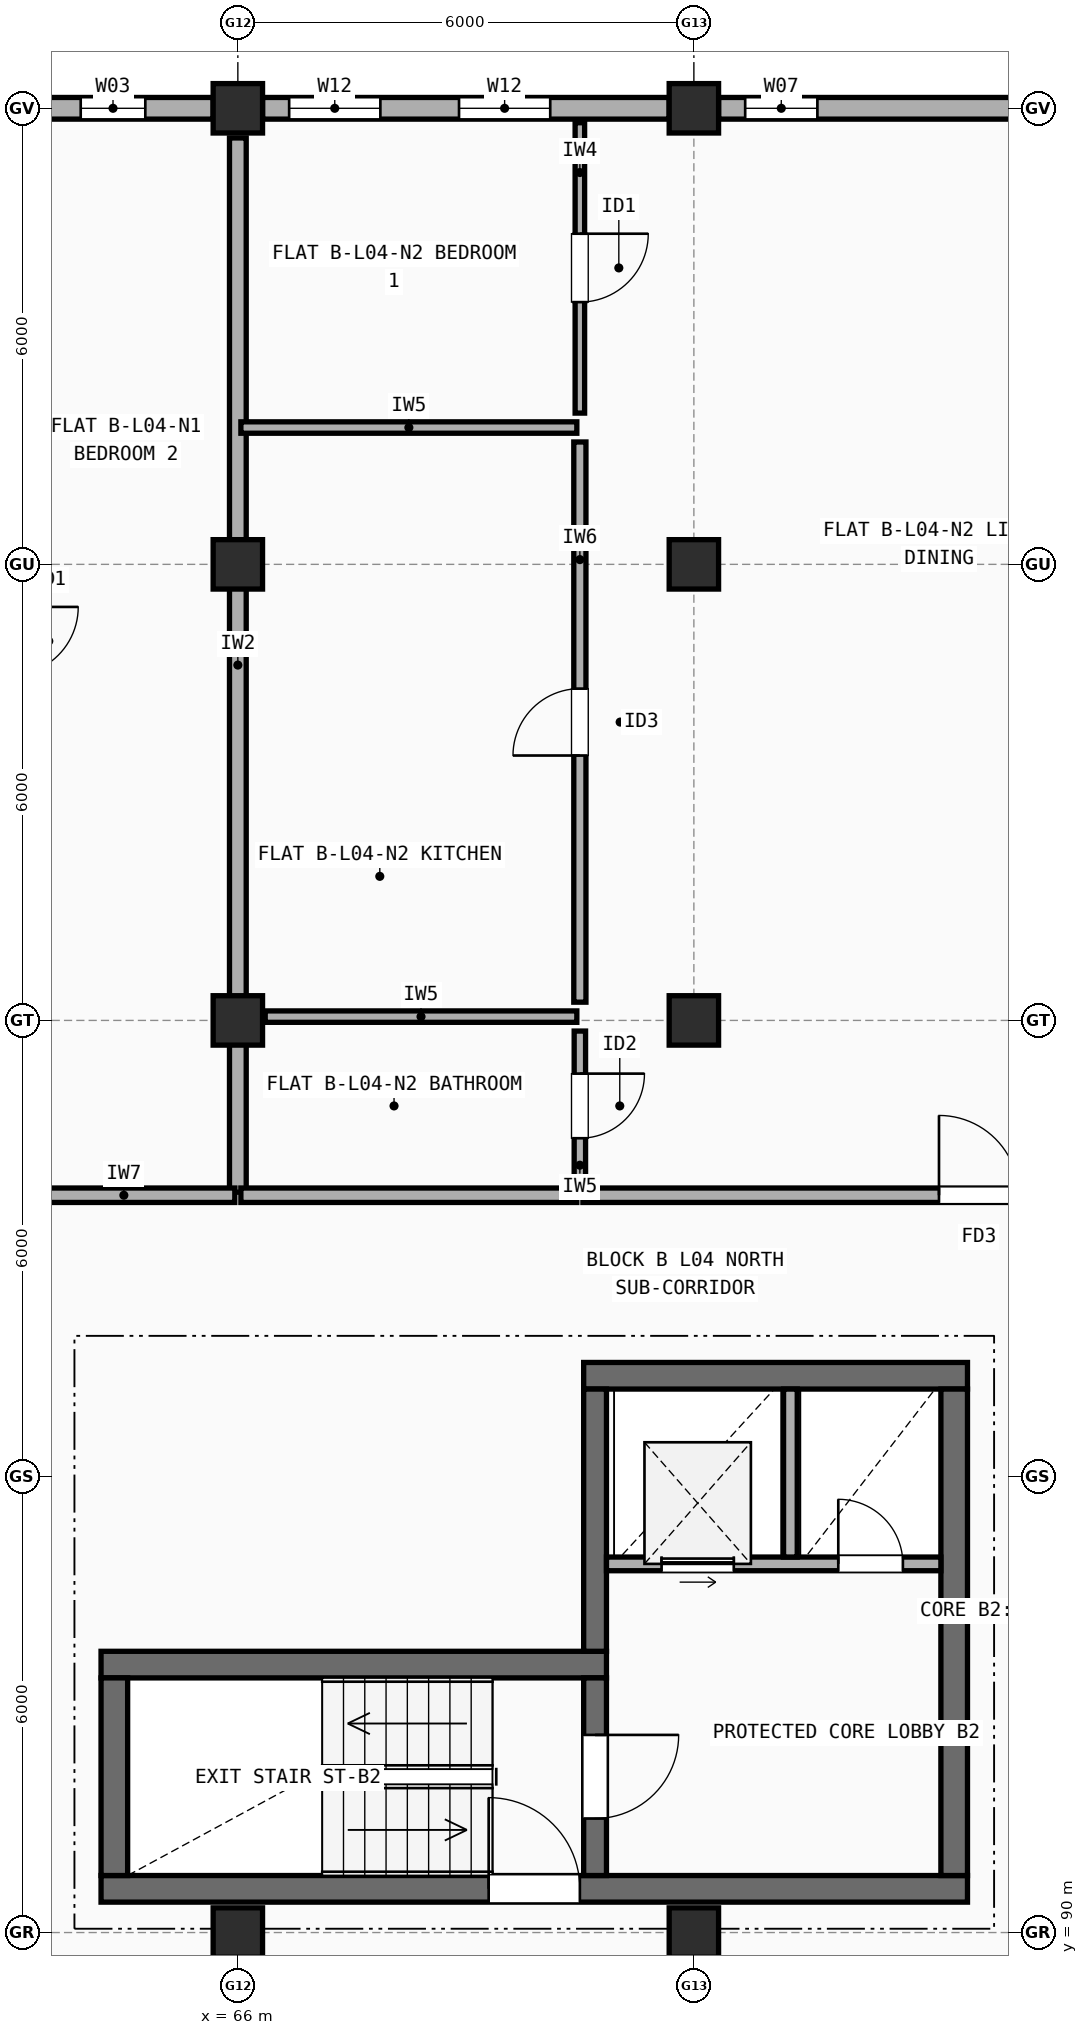
"""IFC4 building model, lengths in metres.
Left out: names, types, materials, properties, quantities, classifications, styles, units other than length and angle.
Written with IfcOpenShell. Run it as: python <this file> out.ifc"""

import sys

from ifc_helpers import new_model, si_unit, direction, frame, frame_2d, origin, origin_2d, place, context, subcontext, project, spatial, rectangle, extrude, element, fill, save


model = new_model("IFC4")
c1 = context("Model", 3, precision=1e-05, world=origin(), true_north=direction((0.0, 1.0)))
c2 = subcontext(c1, "Body", "Model", "MODEL_VIEW")
j1 = project(units=[si_unit("LENGTHUNIT", "METRE"), si_unit("PLANEANGLEUNIT", "RADIAN")], contexts=[c1])
p1 = place(None, origin())
s1 = spatial("IfcSite", under=j1, at=p1, CompositionType="ELEMENT")
p2 = place(p1, origin())
s2 = spatial("IfcBuilding", under=s1, at=p2, CompositionType="ELEMENT")
p3 = place(p2, frame((0.0, 0.0, 14.1)))
s3 = spatial("IfcBuildingStorey", under=s2, at=p3, CompositionType="ELEMENT", Elevation=14.1)
for number, where, z_axis, x_axis in (
    (1, (66.0, 90.0, 0.0), (0.0, 0.0, 1.0), (1.0, 0.0, 0.0)),
    (2, (66.0, 102.0, 0.0), (0.0, 0.0, 1.0), (1.0, 0.0, 0.0)),
    (3, (66.0, 108.0, 0.0), (0.0, 0.0, 1.0), (1.0, 0.0, 0.0)),
    (4, (66.0, 114.0, 0.0), (0.0, 0.0, 1.0), (1.0, 0.0, 0.0)),
    (5, (72.0, 90.0, 0.0), (0.0, 0.0, 1.0), (1.0, 0.0, 0.0)),
    (6, (72.0, 102.0, 0.0), (0.0, 0.0, 1.0), (1.0, 0.0, 0.0)),
    (7, (72.0, 108.0, 0.0), (0.0, 0.0, 1.0), (1.0, 0.0, 0.0)),
    (8, (72.0, 114.0, 0.0), (0.0, 0.0, 1.0), (1.0, 0.0, 0.0)),
):
    element("IfcColumn", number, at=place(p3, frame(where, z_axis=z_axis, x_axis=x_axis)), inside=s3, PredefinedType="COLUMN", context=c2, shape_type="SweptSolid", body=[
        extrude(rectangle(XDim=0.65, YDim=0.65, at=origin_2d()), origin(), (0.0, 0.0, 1.0), 2.95),
    ])
p4 = place(p3, frame((77.725, 114.0, 0.0), z_axis=(0.0, 0.0, 1.0), x_axis=(-1.0, 0.0, 0.0)))
e9 = element("IfcWall", 9, at=p4, inside=s3, PredefinedType="STANDARD", context=c2, shape_type="SweptSolid", body=[
    extrude(rectangle(XDim=5.4, YDim=0.285, at=frame_2d((2.7, 0.0))), origin(), (0.0, 0.0, 1.0), 2.432),
])
p5 = place(p4, frame((0.35, 0.0, 0.9)))
e10 = element("IfcOpeningElement", 10, at=p5, cuts=e9, PredefinedType="OPENING", context=c2, shape_type="SweptSolid", body=[
    extrude(rectangle(XDim=0.95, YDim=1.35, at=frame_2d((0.475, 0.675))), frame((0.0, 0.152, 0.0), z_axis=(0.0, -1.0, 0.0), x_axis=(1.0, 0.0, 0.0)), (0.0, 0.0, 1.0), 0.305),
])
p6 = place(p4, frame((4.1, 0.0, 0.9)))
e11 = element("IfcOpeningElement", 11, at=p6, cuts=e9, PredefinedType="OPENING", context=c2, shape_type="SweptSolid", body=[
    extrude(rectangle(XDim=0.95, YDim=1.35, at=frame_2d((0.475, 0.675))), frame((0.0, 0.152, 0.0), z_axis=(0.0, -1.0, 0.0), x_axis=(1.0, 0.0, 0.0)), (0.0, 0.0, 1.0), 0.305),
])
p7 = place(p3, frame((71.675, 114.0, 0.0), z_axis=(0.0, 0.0, 1.0), x_axis=(-1.0, 0.0, 0.0)))
e12 = element("IfcWall", 12, at=p7, inside=s3, PredefinedType="STANDARD", context=c2, shape_type="SweptSolid", body=[
    extrude(rectangle(XDim=5.35, YDim=0.285, at=frame_2d((2.675, 0.0))), origin(), (0.0, 0.0, 1.0), 2.432),
])
p8 = place(p7, frame((1.565, 0.0, 0.9)))
e13 = element("IfcOpeningElement", 13, at=p8, cuts=e12, PredefinedType="OPENING", context=c2, shape_type="SweptSolid", body=[
    extrude(rectangle(XDim=1.2, YDim=1.35, at=frame_2d((0.6, 0.675))), frame((0.0, 0.152, 0.0), z_axis=(0.0, -1.0, 0.0), x_axis=(1.0, 0.0, 0.0)), (0.0, 0.0, 1.0), 0.305),
])
p9 = place(p7, frame((3.8, 0.0, 0.9)))
e14 = element("IfcOpeningElement", 14, at=p9, cuts=e12, PredefinedType="OPENING", context=c2, shape_type="SweptSolid", body=[
    extrude(rectangle(XDim=1.2, YDim=1.35, at=frame_2d((0.6, 0.675))), frame((0.0, 0.152, 0.0), z_axis=(0.0, -1.0, 0.0), x_axis=(1.0, 0.0, 0.0)), (0.0, 0.0, 1.0), 0.305),
])
p10 = place(p3, frame((65.675, 114.0, 0.0), z_axis=(0.0, 0.0, 1.0), x_axis=(-1.0, 0.0, 0.0)))
e15 = element("IfcWall", 15, at=p10, inside=s3, PredefinedType="STANDARD", context=c2, shape_type="SweptSolid", body=[
    extrude(rectangle(XDim=5.35, YDim=0.285, at=frame_2d((2.675, 0.0))), origin(), (0.0, 0.0, 1.0), 2.432),
])
p11 = place(p10, frame((0.893, 0.0, 0.9)))
e16 = element("IfcOpeningElement", 16, at=p11, cuts=e15, PredefinedType="OPENING", context=c2, shape_type="SweptSolid", body=[
    extrude(rectangle(XDim=0.85, YDim=1.25, at=frame_2d((0.425, 0.625))), frame((0.0, 0.152, 0.0), z_axis=(0.0, -1.0, 0.0), x_axis=(1.0, 0.0, 0.0)), (0.0, 0.0, 1.0), 0.305),
])
p12 = place(p10, frame((3.583, 0.0, 0.9)))
e17 = element("IfcOpeningElement", 17, at=p12, cuts=e15, PredefinedType="OPENING", context=c2, shape_type="SweptSolid", body=[
    extrude(rectangle(XDim=0.9, YDim=1.3, at=frame_2d((0.45, 0.65))), frame((0.0, 0.152, 0.0), z_axis=(0.0, -1.0, 0.0), x_axis=(1.0, 0.0, 0.0)), (0.0, 0.0, 1.0), 0.305),
])
p13 = place(p3, frame((64.2, 90.575, 0.0), z_axis=(0.0, 0.0, 1.0), x_axis=(1.0, 0.0, 0.0)))
e18 = element("IfcWall", 18, at=p13, inside=s3, PredefinedType="SHEAR", context=c2, shape_type="SweptSolid", body=[
    extrude(rectangle(XDim=11.4, YDim=0.35, at=frame_2d((5.7, 0.0))), origin(), (0.0, 0.0, 1.0), 2.95),
])
p14 = place(p13, frame((5.1, 0.0, 0.0)))
e19 = element("IfcOpeningElement", 19, at=p14, cuts=e18, PredefinedType="OPENING", context=c2, shape_type="SweptSolid", body=[
    extrude(rectangle(XDim=1.2, YDim=2.15, at=frame_2d((0.6, 1.075))), frame((0.0, 0.185, 0.0), z_axis=(0.0, -1.0, 0.0), x_axis=(1.0, 0.0, 0.0)), (0.0, 0.0, 1.0), 0.37),
])
p15 = place(p3, frame((70.85, 93.525, 0.0), z_axis=(0.0, 0.0, 1.0), x_axis=(-1.0, 0.0, 0.0)))
e20 = element("IfcWall", 20, at=p15, inside=s3, PredefinedType="SHEAR", context=c2, shape_type="SweptSolid", body=[
    extrude(rectangle(XDim=6.65, YDim=0.35, at=frame_2d((3.325, 0.0))), origin(), (0.0, 0.0, 1.0), 2.95),
])
p16 = place(p3, frame((64.375, 93.35, 0.0), z_axis=(0.0, 0.0, 1.0), x_axis=(0.0, -1.0, 0.0)))
e21 = element("IfcWall", 21, at=p16, inside=s3, PredefinedType="SHEAR", context=c2, shape_type="SweptSolid", body=[
    extrude(rectangle(XDim=2.6, YDim=0.35, at=frame_2d((1.3, 0.0))), origin(), (0.0, 0.0, 1.0), 2.95),
])
p17 = place(p3, frame((70.7, 90.75, 0.0), z_axis=(0.0, 0.0, 1.0), x_axis=(0.0, 1.0, 0.0)))
e22 = element("IfcWall", 22, at=p17, inside=s3, PredefinedType="SHEAR", context=c2, shape_type="SweptSolid", body=[
    extrude(rectangle(XDim=2.6, YDim=0.3, at=frame_2d((1.3, 0.0))), origin(), (0.0, 0.0, 1.0), 2.95),
])
p18 = place(p17, frame((0.75, 0.0, 0.0)))
e23 = element("IfcOpeningElement", 23, at=p18, cuts=e22, PredefinedType="OPENING", context=c2, shape_type="SweptSolid", body=[
    extrude(rectangle(XDim=1.1, YDim=2.15, at=frame_2d((0.55, 1.075))), frame((0.0, 0.16, 0.0), z_axis=(0.0, -1.0, 0.0), x_axis=(1.0, 0.0, 0.0)), (0.0, 0.0, 1.0), 0.32),
])
p19 = place(p3, frame((75.6, 97.325, 0.0), z_axis=(0.0, 0.0, 1.0), x_axis=(-1.0, 0.0, 0.0)))
e24 = element("IfcWall", 24, at=p19, inside=s3, PredefinedType="SHEAR", context=c2, shape_type="SweptSolid", body=[
    extrude(rectangle(XDim=5.05, YDim=0.35, at=frame_2d((2.525, 0.0))), origin(), (0.0, 0.0, 1.0), 2.95),
])
p20 = place(p3, frame((75.425, 90.75, 0.0), z_axis=(0.0, 0.0, 1.0), x_axis=(0.0, 1.0, 0.0)))
e25 = element("IfcWall", 25, at=p20, inside=s3, PredefinedType="SHEAR", context=c2, shape_type="SweptSolid", body=[
    extrude(rectangle(XDim=6.4, YDim=0.35, at=frame_2d((3.2, 0.0))), origin(), (0.0, 0.0, 1.0), 2.95),
])
p21 = place(p3, frame((70.7, 93.7, 0.0), z_axis=(0.0, 0.0, 1.0), x_axis=(0.0, 1.0, 0.0)))
e26 = element("IfcWall", 26, at=p21, inside=s3, PredefinedType="SHEAR", context=c2, shape_type="SweptSolid", body=[
    extrude(rectangle(XDim=3.45, YDim=0.3, at=frame_2d((1.725, 0.0))), origin(), (0.0, 0.0, 1.0), 2.95),
])
p22 = place(p3, frame((70.85, 94.85, 0.0), z_axis=(0.0, 0.0, 1.0), x_axis=(1.0, 0.0, 0.0)))
e27 = element("IfcWall", 27, at=p22, inside=s3, PredefinedType="SOLIDWALL", context=c2, shape_type="SweptSolid", body=[
    extrude(rectangle(XDim=4.4, YDim=0.18, at=frame_2d((2.2, 0.0))), origin(), (0.0, 0.0, 1.0), 2.95),
])
p23 = place(p22, frame((0.725, 0.0, 0.0)))
e28 = element("IfcOpeningElement", 28, at=p23, cuts=e27, PredefinedType="OPENING", context=c2, shape_type="SweptSolid", body=[
    extrude(rectangle(XDim=0.95, YDim=2.15, at=frame_2d((0.475, 1.075))), frame((0.0, 0.1, 0.0), z_axis=(0.0, -1.0, 0.0), x_axis=(1.0, 0.0, 0.0)), (0.0, 0.0, 1.0), 0.2),
])
p24 = place(p22, frame((3.05, 0.0, 0.0)))
e29 = element("IfcOpeningElement", 29, at=p24, cuts=e27, PredefinedType="OPENING", context=c2, shape_type="SweptSolid", body=[
    extrude(rectangle(XDim=0.85, YDim=2.1, at=frame_2d((0.425, 1.05))), frame((0.0, 0.1, 0.0), z_axis=(0.0, -1.0, 0.0), x_axis=(1.0, 0.0, 0.0)), (0.0, 0.0, 1.0), 0.2),
])
p25 = place(p3, frame((73.27, 94.94, 0.0), z_axis=(0.0, 0.0, 1.0), x_axis=(0.0, 1.0, 0.0)))
e30 = element("IfcWall", 30, at=p25, inside=s3, PredefinedType="SOLIDWALL", context=c2, shape_type="SweptSolid", body=[
    extrude(rectangle(XDim=2.21, YDim=0.18, at=frame_2d((1.105, 0.0))), origin(), (0.0, 0.0, 1.0), 2.95),
])
p26 = place(p3, frame((66.0, 99.74, 0.0), z_axis=(0.0, 0.0, 1.0), x_axis=(0.0, 1.0, 0.0)))
e31 = element("IfcWall", 31, at=p26, inside=s3, PredefinedType="SOLIDWALL", context=c2, shape_type="SweptSolid", body=[
    extrude(rectangle(XDim=13.87, YDim=0.22, at=frame_2d((6.935, 0.0))), origin(), (0.0, 0.0, 1.0), 2.458),
])
p27 = place(p3, frame((63.04, 99.7, 0.0), z_axis=(0.0, 0.0, 1.0), x_axis=(1.0, 0.0, 0.0)))
e32 = element("IfcWall", 32, at=p27, inside=s3, PredefinedType="SOLIDWALL", context=c2, shape_type="SweptSolid", body=[
    extrude(rectangle(XDim=2.92, YDim=0.19, at=frame_2d((1.46, 0.0))), origin(), (0.0, 0.0, 1.0), 2.95),
])
p28 = place(p3, frame((66.04, 99.7, 0.0), z_axis=(0.0, 0.0, 1.0), x_axis=(1.0, 0.0, 0.0)))
e33 = element("IfcWall", 33, at=p28, inside=s3, PredefinedType="SOLIDWALL", context=c2, shape_type="SweptSolid", body=[
    extrude(rectangle(XDim=4.42, YDim=0.19, at=frame_2d((2.21, 0.0))), origin(), (0.0, 0.0, 1.0), 2.95),
])
p29 = place(p3, frame((70.54, 99.7, 0.0), z_axis=(0.0, 0.0, 1.0), x_axis=(1.0, 0.0, 0.0)))
e34 = element("IfcWall", 34, at=p29, inside=s3, PredefinedType="SOLIDWALL", context=c2, shape_type="SweptSolid", body=[
    extrude(rectangle(XDim=10.42, YDim=0.19, at=frame_2d((5.21, 0.0))), origin(), (0.0, 0.0, 1.0), 2.432),
])
p30 = place(p29, frame((4.685, 0.0, 0.0)))
e35 = element("IfcOpeningElement", 35, at=p30, cuts=e34, PredefinedType="OPENING", context=c2, shape_type="SweptSolid", body=[
    extrude(rectangle(XDim=1.05, YDim=2.15, at=frame_2d((0.525, 1.075))), frame((0.0, 0.105, 0.0), z_axis=(0.0, -1.0, 0.0), x_axis=(1.0, 0.0, 0.0)), (0.0, 0.0, 1.0), 0.21),
])
p31 = place(p3, frame((70.5, 109.99, 0.0), z_axis=(0.0, 0.0, 1.0), x_axis=(0.0, 1.0, 0.0)))
e36 = element("IfcWall", 36, at=p31, inside=s3, PredefinedType="PARTITIONING", context=c2, shape_type="SweptSolid", body=[
    extrude(rectangle(XDim=3.82, YDim=0.125, at=frame_2d((1.91, 0.0))), origin(), (0.0, 0.0, 1.0), 2.95),
])
p32 = place(p31, frame((1.46, 0.0, 0.0)))
e37 = element("IfcOpeningElement", 37, at=p32, cuts=e36, PredefinedType="OPENING", context=c2, shape_type="SweptSolid", body=[
    extrude(rectangle(XDim=0.9, YDim=2.1, at=frame_2d((0.45, 1.05))), frame((0.0, 0.073, 0.0), z_axis=(0.0, -1.0, 0.0), x_axis=(1.0, 0.0, 0.0)), (0.0, 0.0, 1.0), 0.145),
])
p33 = place(p3, frame((70.5, 102.24, 0.0), z_axis=(0.0, 0.0, 1.0), x_axis=(0.0, 1.0, 0.0)))
e38 = element("IfcWall", 38, at=p33, inside=s3, PredefinedType="PLUMBINGWALL", context=c2, shape_type="SweptSolid", body=[
    extrude(rectangle(XDim=7.37, YDim=0.16, at=frame_2d((3.685, 0.0))), origin(), (0.0, 0.0, 1.0), 2.432),
])
p34 = place(p33, frame((3.245, 0.0, 0.0)))
e39 = element("IfcOpeningElement", 39, at=p34, cuts=e38, PredefinedType="OPENING", context=c2, shape_type="SweptSolid", body=[
    extrude(rectangle(XDim=0.88, YDim=2.1, at=frame_2d((0.44, 1.05))), frame((0.0, 0.09, 0.0), z_axis=(0.0, -1.0, 0.0), x_axis=(1.0, 0.0, 0.0)), (0.0, 0.0, 1.0), 0.18),
])
p35 = place(p3, frame((70.5, 99.89, 0.0), z_axis=(0.0, 0.0, 1.0), x_axis=(0.0, 1.0, 0.0)))
e40 = element("IfcWall", 40, at=p35, inside=s3, PredefinedType="PARTITIONING", context=c2, shape_type="SweptSolid", body=[
    extrude(rectangle(XDim=1.97, YDim=0.15, at=frame_2d((0.985, 0.0))), origin(), (0.0, 0.0, 1.0), 2.95),
])
p36 = place(p35, frame((0.56, 0.0, 0.0)))
e41 = element("IfcOpeningElement", 41, at=p36, cuts=e40, PredefinedType="OPENING", context=c2, shape_type="SweptSolid", body=[
    extrude(rectangle(XDim=0.85, YDim=2.1, at=frame_2d((0.425, 1.05))), frame((0.0, 0.085, 0.0), z_axis=(0.0, -1.0, 0.0), x_axis=(1.0, 0.0, 0.0)), (0.0, 0.0, 1.0), 0.17),
])
p37 = place(p3, frame((66.04, 109.8, 0.0), z_axis=(0.0, 0.0, 1.0), x_axis=(1.0, 0.0, 0.0)))
e42 = element("IfcWall", 42, at=p37, inside=s3, PredefinedType="PARTITIONING", context=c2, shape_type="SweptSolid", body=[
    extrude(rectangle(XDim=4.42, YDim=0.15, at=frame_2d((2.21, 0.0))), origin(), (0.0, 0.0, 1.0), 2.458),
])
p38 = place(p3, frame((66.36, 102.05, 0.0), z_axis=(0.0, 0.0, 1.0), x_axis=(1.0, 0.0, 0.0)))
e43 = element("IfcWall", 43, at=p38, inside=s3, PredefinedType="PARTITIONING", context=c2, shape_type="SweptSolid", body=[
    extrude(rectangle(XDim=4.1, YDim=0.15, at=frame_2d((2.05, 0.0))), origin(), (0.0, 0.0, 1.0), 2.432),
])
p39 = place(p6, origin())
e44 = element("IfcWindow", 44, at=p39, inside=s3, PartitioningType="SINGLE_PANEL", PredefinedType="WINDOW", context=c2, shape_type="SweptSolid", body=[
    extrude(rectangle(XDim=0.95, YDim=1.35, at=frame_2d((0.475, 0.675))), frame((0.0, 0.03, 0.0), z_axis=(0.0, -1.0, 0.0), x_axis=(1.0, 0.0, 0.0)), (0.0, 0.0, 1.0), 0.06),
])
fill(e11, e44)
p40 = place(p8, origin())
e45 = element("IfcWindow", 45, at=p40, inside=s3, PartitioningType="SINGLE_PANEL", PredefinedType="WINDOW", context=c2, shape_type="SweptSolid", body=[
    extrude(rectangle(XDim=1.2, YDim=1.35, at=frame_2d((0.6, 0.675))), frame((0.0, 0.03, 0.0), z_axis=(0.0, -1.0, 0.0), x_axis=(1.0, 0.0, 0.0)), (0.0, 0.0, 1.0), 0.06),
])
fill(e13, e45)
p41 = place(p9, origin())
e46 = element("IfcWindow", 46, at=p41, inside=s3, PartitioningType="SINGLE_PANEL", PredefinedType="WINDOW", context=c2, shape_type="SweptSolid", body=[
    extrude(rectangle(XDim=1.2, YDim=1.35, at=frame_2d((0.6, 0.675))), frame((0.0, 0.03, 0.0), z_axis=(0.0, -1.0, 0.0), x_axis=(1.0, 0.0, 0.0)), (0.0, 0.0, 1.0), 0.06),
])
fill(e14, e46)
p42 = place(p11, origin())
e47 = element("IfcWindow", 47, at=p42, inside=s3, PartitioningType="SINGLE_PANEL", PredefinedType="WINDOW", context=c2, shape_type="SweptSolid", body=[
    extrude(rectangle(XDim=0.85, YDim=1.25, at=frame_2d((0.425, 0.625))), frame((0.0, 0.03, 0.0), z_axis=(0.0, -1.0, 0.0), x_axis=(1.0, 0.0, 0.0)), (0.0, 0.0, 1.0), 0.06),
])
fill(e16, e47)
p43 = place(p14, origin())
e48 = element("IfcDoor", 48, at=p43, inside=s3, OperationType="SINGLE_SWING_LEFT", PredefinedType="DOOR", context=c2, shape_type="SweptSolid", body=[
    extrude(rectangle(XDim=1.2, YDim=2.15, at=frame_2d((0.6, 1.075))), frame((0.0, 0.025, 0.0), z_axis=(0.0, -1.0, 0.0), x_axis=(1.0, 0.0, 0.0)), (0.0, 0.0, 1.0), 0.05),
])
fill(e19, e48)
p44 = place(p18, origin())
e49 = element("IfcDoor", 49, at=p44, inside=s3, OperationType="SINGLE_SWING_RIGHT", PredefinedType="DOOR", context=c2, shape_type="SweptSolid", body=[
    extrude(rectangle(XDim=1.1, YDim=2.15, at=frame_2d((0.55, 1.075))), frame((0.0, 0.025, 0.0), z_axis=(0.0, -1.0, 0.0), x_axis=(1.0, 0.0, 0.0)), (0.0, 0.0, 1.0), 0.05),
])
fill(e23, e49)
p45 = place(p23, origin())
e50 = element("IfcDoor", 50, at=p45, inside=s3, OperationType="SLIDING_TO_LEFT", PredefinedType="DOOR", context=c2, shape_type="SweptSolid", body=[
    extrude(rectangle(XDim=0.95, YDim=2.15, at=frame_2d((0.475, 1.075))), frame((0.0, 0.025, 0.0), z_axis=(0.0, -1.0, 0.0), x_axis=(1.0, 0.0, 0.0)), (0.0, 0.0, 1.0), 0.05),
])
fill(e28, e50)
p46 = place(p24, frame((0.85, 0.0, 0.0), z_axis=(0.0, 0.0, 1.0), x_axis=(-1.0, 0.0, 0.0)))
e51 = element("IfcDoor", 51, at=p46, inside=s3, OperationType="SINGLE_SWING_LEFT", PredefinedType="DOOR", context=c2, shape_type="SweptSolid", body=[
    extrude(rectangle(XDim=0.85, YDim=2.1, at=frame_2d((0.425, 1.05))), frame((0.0, 0.025, 0.0), z_axis=(0.0, -1.0, 0.0), x_axis=(1.0, 0.0, 0.0)), (0.0, 0.0, 1.0), 0.05),
])
fill(e29, e51)
p47 = place(p30, origin())
e52 = element("IfcDoor", 52, at=p47, inside=s3, OperationType="SINGLE_SWING_LEFT", PredefinedType="DOOR", context=c2, shape_type="SweptSolid", body=[
    extrude(rectangle(XDim=1.05, YDim=2.15, at=frame_2d((0.525, 1.075))), frame((0.0, 0.025, 0.0), z_axis=(0.0, -1.0, 0.0), x_axis=(1.0, 0.0, 0.0)), (0.0, 0.0, 1.0), 0.05),
])
fill(e35, e52)
p48 = place(p32, origin())
e53 = element("IfcDoor", 53, at=p48, inside=s3, OperationType="SINGLE_SWING_RIGHT", PredefinedType="DOOR", context=c2, shape_type="SweptSolid", body=[
    extrude(rectangle(XDim=0.9, YDim=2.1, at=frame_2d((0.45, 1.05))), frame((0.0, 0.025, 0.0), z_axis=(0.0, -1.0, 0.0), x_axis=(1.0, 0.0, 0.0)), (0.0, 0.0, 1.0), 0.05),
])
fill(e37, e53)
p49 = place(p34, origin())
e54 = element("IfcDoor", 54, at=p49, inside=s3, OperationType="SINGLE_SWING_LEFT", PredefinedType="DOOR", context=c2, shape_type="SweptSolid", body=[
    extrude(rectangle(XDim=0.88, YDim=2.1, at=frame_2d((0.44, 1.05))), frame((0.0, 0.025, 0.0), z_axis=(0.0, -1.0, 0.0), x_axis=(1.0, 0.0, 0.0)), (0.0, 0.0, 1.0), 0.05),
])
fill(e39, e54)
p50 = place(p36, origin())
e55 = element("IfcDoor", 55, at=p50, inside=s3, OperationType="SINGLE_SWING_RIGHT", PredefinedType="DOOR", context=c2, shape_type="SweptSolid", body=[
    extrude(rectangle(XDim=0.85, YDim=2.1, at=frame_2d((0.425, 1.05))), frame((0.0, 0.025, 0.0), z_axis=(0.0, -1.0, 0.0), x_axis=(1.0, 0.0, 0.0)), (0.0, 0.0, 1.0), 0.05),
])
fill(e41, e55)
save(model, sys.argv[1])
